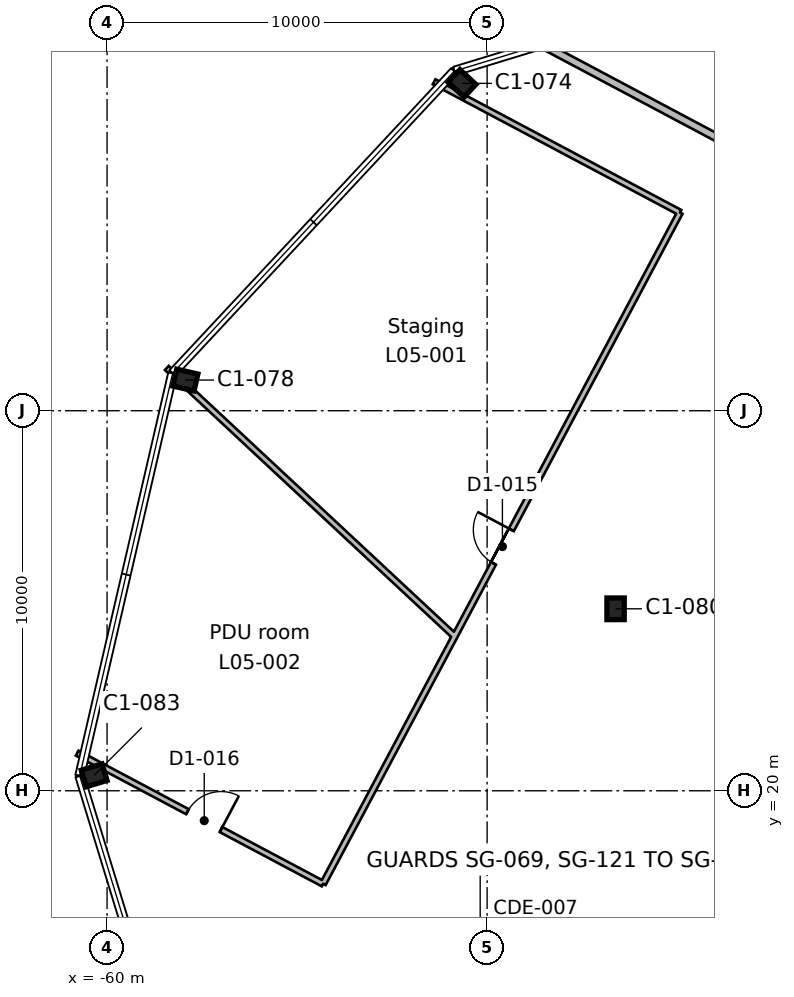
"""IFC4 building model, lengths in metres.
Left out: names, types, materials, properties, quantities, classifications, styles, units other than length and angle.
Written with IfcOpenShell. Run it as: python <this file> out.ifc"""

import sys

from ifc_helpers import new_model, si_unit, direction, frame, frame_2d, origin, origin_2d, place, context, subcontext, project, spatial, rectangle, i_section, extrude, element, fill, save


model = new_model("IFC4")
c1 = context("Model", 3, precision=1e-05, world=origin(), true_north=direction((0.0, 1.0)))
c2 = subcontext(c1, "Body", "Model", "MODEL_VIEW")
j1 = project(units=[si_unit("LENGTHUNIT", "METRE"), si_unit("PLANEANGLEUNIT", "RADIAN")], contexts=[c1])
p1 = place(None, origin())
s1 = spatial("IfcSite", under=j1, at=p1, CompositionType="ELEMENT")
p2 = place(p1, origin())
s2 = spatial("IfcBuilding", under=s1, at=p2, CompositionType="ELEMENT")
p3 = place(p2, frame((0.0, 0.0, 28.4)))
s3 = spatial("IfcBuildingStorey", under=s2, at=p3, CompositionType="ELEMENT", Elevation=28.4)
for number, where, z_axis, x_axis in (
    (1, (-60.34, 20.407, 0.0), (0.0, 0.0, 1.0), (0.292, -0.956, 0.0)),
    (2, (-46.62, 24.788, 0.0), (0.0, 0.0, 1.0), (1.0, 0.0, 0.0)),
    (3, (-57.939, 30.807, 0.0), (0.0, 0.0, 1.0), (-0.225, -0.974, 0.0)),
    (4, (-50.66, 38.613, 0.0), (0.0, 0.0, 1.0), (-0.682, -0.731, 0.0)),
):
    element("IfcColumn", number, at=place(p3, frame(where, z_axis=z_axis, x_axis=x_axis)), inside=s3, PredefinedType="COLUMN", context=c2, shape_type="SweptSolid", body=[
        extrude(i_section(OverallWidth=0.455, OverallDepth=0.569, WebThickness=0.078, FlangeThickness=0.125, FilletRadius=0.015, at=origin_2d()), origin(), (0.0, 0.0, 1.0), 5.4),
    ])
p4 = place(p3, frame((-60.787, 20.992, 0.0), z_axis=(0.0, 0.0, 1.0), x_axis=(0.882995783921, -0.469380917356, 0.0)))
e5 = element("IfcWall", 5, at=p4, inside=s3, PredefinedType="PARTITIONING", context=c2, shape_type="SweptSolid", body=[
    extrude(rectangle(XDim=7.329, YDim=0.15, at=frame_2d((3.664, 0.0))), origin(), (0.0, 0.0, 1.0), 4.95),
])
p5 = place(p4, frame((3.287, 0.0, 0.0)))
e6 = element("IfcOpeningElement", 6, at=p5, cuts=e5, PredefinedType="OPENING", context=c2, shape_type="SweptSolid", body=[
    extrude(rectangle(XDim=1.0, YDim=2.1, at=frame_2d((0.5, 1.05))), frame((0.0, 0.085, 0.0), z_axis=(0.0, -1.0, 0.0), x_axis=(1.0, 0.0, 0.0)), (0.0, 0.0, 1.0), 0.17),
])
p6 = place(p3, frame((-54.316, 17.552, 0.0), z_axis=(0.0, 0.0, 1.0), x_axis=(0.469479992782, 0.882943110499, 0.0)))
e7 = element("IfcWall", 7, at=p6, inside=s3, PredefinedType="PARTITIONING", context=c2, shape_type="SweptSolid", body=[
    extrude(rectangle(XDim=20.005, YDim=0.15, at=frame_2d((10.002, 0.0))), origin(), (0.0, 0.0, 1.0), 4.95),
])
p7 = place(p6, frame((9.55, 0.0, 0.0)))
e8 = element("IfcOpeningElement", 8, at=p7, cuts=e7, PredefinedType="OPENING", context=c2, shape_type="SweptSolid", body=[
    extrude(rectangle(XDim=1.0, YDim=2.1, at=frame_2d((0.5, 1.05))), frame((0.0, 0.085, 0.0), z_axis=(0.0, -1.0, 0.0), x_axis=(1.0, 0.0, 0.0)), (0.0, 0.0, 1.0), 0.17),
])
p8 = place(p3, frame((-44.924, 35.215, 0.0), z_axis=(0.0, 0.0, 1.0), x_axis=(-0.883017799447, 0.469339499574, 0.0)))
e9 = element("IfcWall", 9, at=p8, inside=s3, PredefinedType="PARTITIONING", context=c2, shape_type="SweptSolid", body=[
    extrude(rectangle(XDim=7.329, YDim=0.15, at=frame_2d((3.665, 0.0))), origin(), (0.0, 0.0, 1.0), 4.95),
])
p9 = place(p3, frame((-58.427, 31.125, 0.0), z_axis=(0.0, 0.0, 1.0), x_axis=(0.731440901907, -0.681904837216, 0.0)))
e10 = element("IfcWall", 10, at=p9, inside=s3, PredefinedType="PARTITIONING", context=c2, shape_type="SweptSolid", body=[
    extrude(rectangle(XDim=10.355, YDim=0.15, at=frame_2d((5.177, 0.0))), origin(), (0.0, 0.0, 1.0), 4.95),
])
p10 = place(p3, frame((-48.814, 39.77, 0.0), z_axis=(0.0, 0.0, 1.0), x_axis=(0.882945848707, -0.469474843043, 0.0)))
e11 = element("IfcWall", 11, at=p10, inside=s3, PredefinedType="PARTITIONING", context=c2, shape_type="SweptSolid", body=[
    extrude(rectangle(XDim=55.285, YDim=0.2, at=frame_2d((27.643, 0.0))), origin(), (0.0, 0.0, 1.0), 4.95),
])
p11 = place(p10, frame((39.465, 0.0, 0.0)))
e12 = element("IfcOpeningElement", 12, at=p11, cuts=e11, PredefinedType="OPENING", context=c2, shape_type="SweptSolid", body=[
    extrude(rectangle(XDim=1.0, YDim=2.1, at=frame_2d((0.5, 1.05))), frame((0.0, 0.11, 0.0), z_axis=(0.0, -1.0, 0.0), x_axis=(1.0, 0.0, 0.0)), (0.0, 0.0, 1.0), 0.22),
])
p12 = place(p10, frame((27.366, 0.0, 0.0)))
e13 = element("IfcOpeningElement", 13, at=p12, cuts=e11, PredefinedType="OPENING", context=c2, shape_type="SweptSolid", body=[
    extrude(rectangle(XDim=1.0, YDim=2.1, at=frame_2d((0.5, 1.05))), frame((0.0, 0.11, 0.0), z_axis=(0.0, -1.0, 0.0), x_axis=(1.0, 0.0, 0.0)), (0.0, 0.0, 1.0), 0.22),
])
p13 = place(p10, frame((15.665, 0.0, 0.0)))
e14 = element("IfcOpeningElement", 14, at=p13, cuts=e11, PredefinedType="OPENING", context=c2, shape_type="SweptSolid", body=[
    extrude(rectangle(XDim=1.0, YDim=2.1, at=frame_2d((0.5, 1.05))), frame((0.0, 0.11, 0.0), z_axis=(0.0, -1.0, 0.0), x_axis=(1.0, 0.0, 0.0)), (0.0, 0.0, 1.0), 0.22),
])
p14 = place(p7, origin())
e15 = element("IfcDoor", 15, at=p14, inside=s3, OperationType="SINGLE_SWING_RIGHT", PredefinedType="DOOR", context=c2, shape_type="SweptSolid", body=[
    extrude(rectangle(XDim=1.0, YDim=2.1, at=frame_2d((0.5, 1.05))), frame((0.0, 0.025, 0.0), z_axis=(0.0, -1.0, 0.0), x_axis=(1.0, 0.0, 0.0)), (0.0, 0.0, 1.0), 0.05),
])
fill(e8, e15)
p15 = place(p5, origin())
e16 = element("IfcDoor", 16, at=p15, inside=s3, OperationType="SINGLE_SWING_RIGHT", PredefinedType="DOOR", context=c2, shape_type="SweptSolid", body=[
    extrude(rectangle(XDim=1.0, YDim=2.1, at=frame_2d((0.5, 1.05))), frame((0.0, 0.025, 0.0), z_axis=(0.0, -1.0, 0.0), x_axis=(1.0, 0.0, 0.0)), (0.0, 0.0, 1.0), 0.05),
])
fill(e6, e16)
save(model, sys.argv[1])
